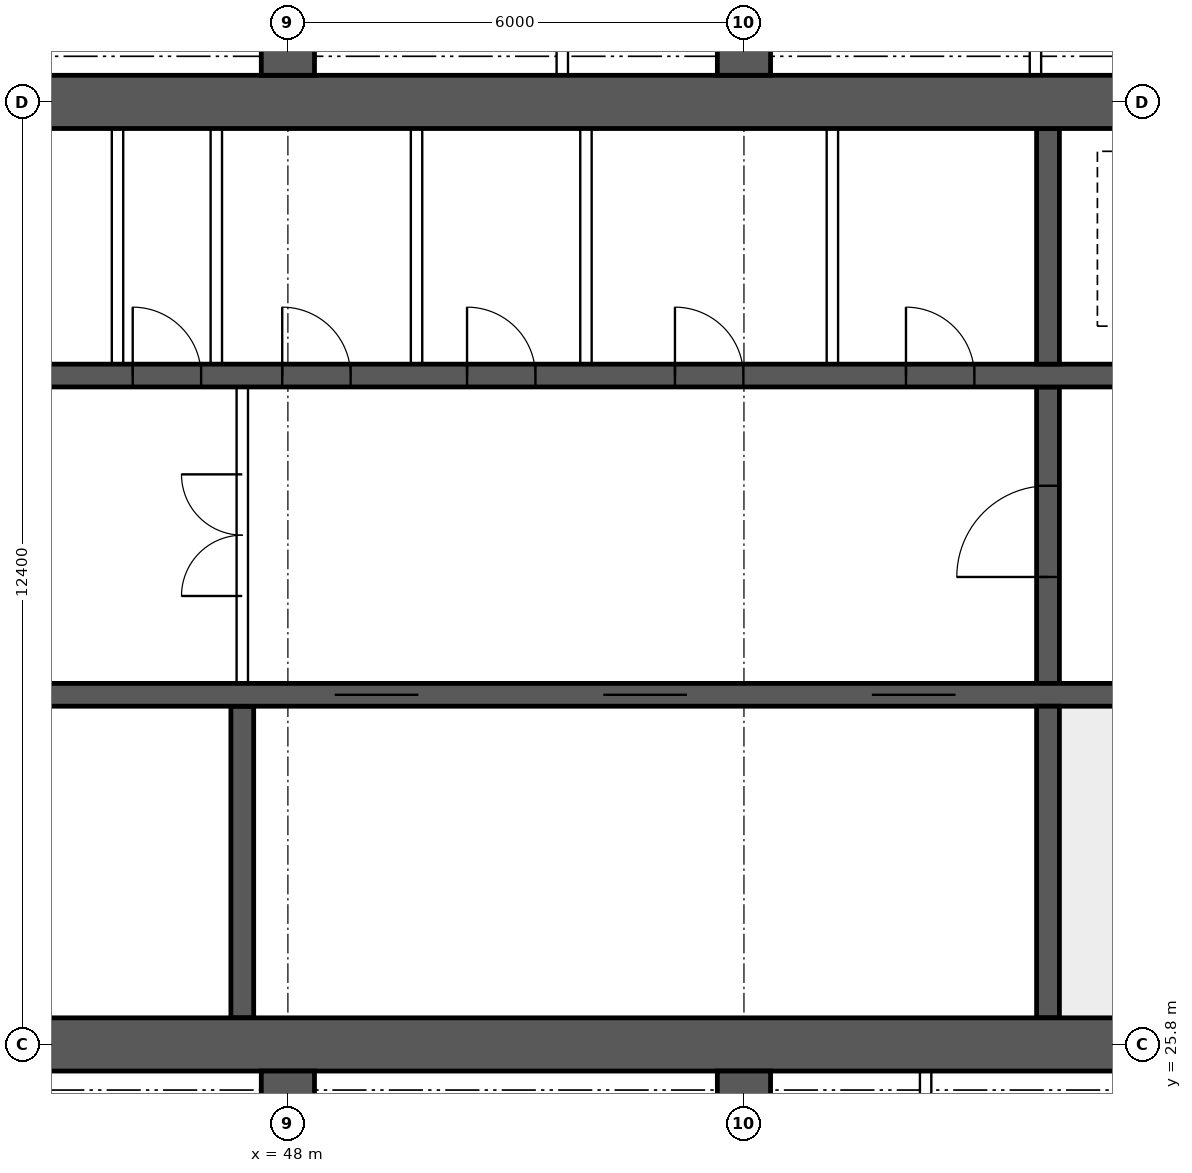
"""IFC4 building model, lengths in metres.
Left out: names, types, materials, properties, quantities, classifications, styles, units other than length and angle.
Written with IfcOpenShell. Run it as: python <this file> out.ifc"""

import sys

from ifc_helpers import new_model, si_unit, direction, frame, frame_2d, origin, place, context, subcontext, project, spatial, rectangle, extrude, element, fill, save


model = new_model("IFC4")
c1 = context("Model", 3, precision=1e-05, world=origin(), true_north=direction((0.0, 1.0)))
c2 = subcontext(c1, "Body", "Model", "MODEL_VIEW")
j1 = project(units=[si_unit("LENGTHUNIT", "METRE"), si_unit("PLANEANGLEUNIT", "RADIAN")], contexts=[c1])
p1 = place(None, origin())
s1 = spatial("IfcSite", under=j1, at=p1, CompositionType="ELEMENT")
p2 = place(p1, origin())
s2 = spatial("IfcBuilding", under=s1, at=p2, CompositionType="ELEMENT")
p3 = place(p2, frame((0.0, 0.0, 220.3)))
s3 = spatial("IfcBuildingStorey", under=s2, at=p3, CompositionType="ELEMENT", Elevation=220.3)
for number, where, z_axis, x_axis in (
    (1, (18.0, 25.8, 0.0), (0.0, 0.0, 1.0), (1.0, 0.0, 0.0)),
    (2, (18.0, 38.2, 0.0), (0.0, 0.0, 1.0), (1.0, 0.0, 0.0)),
):
    element("IfcWall", number, at=place(p3, frame(where, z_axis=z_axis, x_axis=x_axis)), inside=s3, PredefinedType="SHEAR", context=c2, shape_type="SweptSolid", body=[
        extrude(rectangle(XDim=48.0, YDim=0.7, at=frame_2d((24.0, 0.0))), origin(), (0.0, 0.0, 1.0), 3.75),
    ])
p4 = place(p3, frame((18.35, 30.4, 0.0), z_axis=(0.0, 0.0, 1.0), x_axis=(1.0, 0.0, 0.0)))
e3 = element("IfcWall", 3, at=p4, inside=s3, PredefinedType="SHEAR", context=c2, shape_type="SweptSolid", body=[
    extrude(rectangle(XDim=47.3, YDim=0.3, at=frame_2d((23.65, 0.0))), origin(), (0.0, 0.0, 1.0), 3.75),
])
p5 = place(p4, frame((0.4, 0.0, 0.0)))
e4 = element("IfcOpeningElement", 4, at=p5, cuts=e3, PredefinedType="OPENING", context=c2, shape_type="SweptSolid", body=[
    extrude(rectangle(XDim=1.0, YDim=2.1, at=frame_2d((0.5, 1.05))), frame((0.0, 0.16, 0.0), z_axis=(0.0, -1.0, 0.0), x_axis=(1.0, 0.0, 0.0)), (0.0, 0.0, 1.0), 0.32),
])
p6 = place(p4, frame((45.9, 0.0, 0.0)))
e5 = element("IfcOpeningElement", 5, at=p6, cuts=e3, PredefinedType="OPENING", context=c2, shape_type="SweptSolid", body=[
    extrude(rectangle(XDim=1.0, YDim=2.1, at=frame_2d((0.5, 1.05))), frame((0.0, 0.16, 0.0), z_axis=(0.0, -1.0, 0.0), x_axis=(1.0, 0.0, 0.0)), (0.0, 0.0, 1.0), 0.32),
])
p7 = place(p4, frame((8.4, 0.0, 0.0)))
e6 = element("IfcOpeningElement", 6, at=p7, cuts=e3, PredefinedType="OPENING", context=c2, shape_type="SweptSolid", body=[
    extrude(rectangle(XDim=1.1, YDim=2.1, at=frame_2d((0.55, 1.05))), frame((0.0, 0.16, 0.0), z_axis=(0.0, -1.0, 0.0), x_axis=(1.0, 0.0, 0.0)), (0.0, 0.0, 1.0), 0.32),
])
p8 = place(p4, frame((11.0, 0.0, 0.0)))
e7 = element("IfcOpeningElement", 7, at=p8, cuts=e3, PredefinedType="OPENING", context=c2, shape_type="SweptSolid", body=[
    extrude(rectangle(XDim=1.1, YDim=2.1, at=frame_2d((0.55, 1.05))), frame((0.0, 0.16, 0.0), z_axis=(0.0, -1.0, 0.0), x_axis=(1.0, 0.0, 0.0)), (0.0, 0.0, 1.0), 0.32),
])
p9 = place(p4, frame((13.6, 0.0, 0.0)))
e8 = element("IfcOpeningElement", 8, at=p9, cuts=e3, PredefinedType="OPENING", context=c2, shape_type="SweptSolid", body=[
    extrude(rectangle(XDim=1.1, YDim=2.1, at=frame_2d((0.55, 1.05))), frame((0.0, 0.16, 0.0), z_axis=(0.0, -1.0, 0.0), x_axis=(1.0, 0.0, 0.0)), (0.0, 0.0, 1.0), 0.32),
])
p10 = place(p4, frame((16.2, 0.0, 0.0)))
e9 = element("IfcOpeningElement", 9, at=p10, cuts=e3, PredefinedType="OPENING", context=c2, shape_type="SweptSolid", body=[
    extrude(rectangle(XDim=1.1, YDim=2.1, at=frame_2d((0.55, 1.05))), frame((0.0, 0.16, 0.0), z_axis=(0.0, -1.0, 0.0), x_axis=(1.0, 0.0, 0.0)), (0.0, 0.0, 1.0), 0.32),
])
p11 = place(p4, frame((18.975, 0.0, 0.0)))
e10 = element("IfcOpeningElement", 10, at=p11, cuts=e3, PredefinedType="OPENING", context=c2, shape_type="SweptSolid", body=[
    extrude(rectangle(XDim=0.9, YDim=2.1, at=frame_2d((0.45, 1.05))), frame((0.0, 0.16, 0.0), z_axis=(0.0, -1.0, 0.0), x_axis=(1.0, 0.0, 0.0)), (0.0, 0.0, 1.0), 0.32),
])
p12 = place(p4, frame((24.475, 0.0, 0.0)))
e11 = element("IfcOpeningElement", 11, at=p12, cuts=e3, PredefinedType="OPENING", context=c2, shape_type="SweptSolid", body=[
    extrude(rectangle(XDim=0.9, YDim=2.1, at=frame_2d((0.45, 1.05))), frame((0.0, 0.16, 0.0), z_axis=(0.0, -1.0, 0.0), x_axis=(1.0, 0.0, 0.0)), (0.0, 0.0, 1.0), 0.32),
])
p13 = place(p4, frame((30.267, 0.0, 0.0)))
e12 = element("IfcOpeningElement", 12, at=p13, cuts=e3, PredefinedType="OPENING", context=c2, shape_type="SweptSolid", body=[
    extrude(rectangle(XDim=1.1, YDim=2.1, at=frame_2d((0.55, 1.05))), frame((0.0, 0.16, 0.0), z_axis=(0.0, -1.0, 0.0), x_axis=(1.0, 0.0, 0.0)), (0.0, 0.0, 1.0), 0.32),
])
p14 = place(p4, frame((33.8, 0.0, 0.0)))
e13 = element("IfcOpeningElement", 13, at=p14, cuts=e3, PredefinedType="OPENING", context=c2, shape_type="SweptSolid", body=[
    extrude(rectangle(XDim=1.1, YDim=2.1, at=frame_2d((0.55, 1.05))), frame((0.0, 0.16, 0.0), z_axis=(0.0, -1.0, 0.0), x_axis=(1.0, 0.0, 0.0)), (0.0, 0.0, 1.0), 0.32),
])
p15 = place(p4, frame((37.333, 0.0, 0.0)))
e14 = element("IfcOpeningElement", 14, at=p15, cuts=e3, PredefinedType="OPENING", context=c2, shape_type="SweptSolid", body=[
    extrude(rectangle(XDim=1.1, YDim=2.1, at=frame_2d((0.55, 1.05))), frame((0.0, 0.16, 0.0), z_axis=(0.0, -1.0, 0.0), x_axis=(1.0, 0.0, 0.0)), (0.0, 0.0, 1.0), 0.32),
])
p16 = place(p3, frame((18.35, 34.6, 0.0), z_axis=(0.0, 0.0, 1.0), x_axis=(1.0, 0.0, 0.0)))
e15 = element("IfcWall", 15, at=p16, inside=s3, PredefinedType="SHEAR", context=c2, shape_type="SweptSolid", body=[
    extrude(rectangle(XDim=47.3, YDim=0.3, at=frame_2d((23.65, 0.0))), origin(), (0.0, 0.0, 1.0), 3.75),
])
p17 = place(p16, frame((0.9, 0.0, 0.0)))
e16 = element("IfcOpeningElement", 16, at=p17, cuts=e15, PredefinedType="OPENING", context=c2, shape_type="SweptSolid", body=[
    extrude(rectangle(XDim=1.1, YDim=2.1, at=frame_2d((0.55, 1.05))), frame((0.0, 0.16, 0.0), z_axis=(0.0, -1.0, 0.0), x_axis=(1.0, 0.0, 0.0)), (0.0, 0.0, 1.0), 0.32),
])
p18 = place(p16, frame((45.3, 0.0, 0.0)))
e17 = element("IfcOpeningElement", 17, at=p18, cuts=e15, PredefinedType="OPENING", context=c2, shape_type="SweptSolid", body=[
    extrude(rectangle(XDim=1.1, YDim=2.1, at=frame_2d((0.55, 1.05))), frame((0.0, 0.16, 0.0), z_axis=(0.0, -1.0, 0.0), x_axis=(1.0, 0.0, 0.0)), (0.0, 0.0, 1.0), 0.32),
])
p19 = place(p16, frame((4.25, 0.0, 0.0)))
e18 = element("IfcOpeningElement", 18, at=p19, cuts=e15, PredefinedType="OPENING", context=c2, shape_type="SweptSolid", body=[
    extrude(rectangle(XDim=0.9, YDim=2.1, at=frame_2d((0.45, 1.05))), frame((0.0, 0.16, 0.0), z_axis=(0.0, -1.0, 0.0), x_axis=(1.0, 0.0, 0.0)), (0.0, 0.0, 1.0), 0.32),
])
p20 = place(p16, frame((42.15, 0.0, 0.0)))
e19 = element("IfcOpeningElement", 19, at=p20, cuts=e15, PredefinedType="OPENING", context=c2, shape_type="SweptSolid", body=[
    extrude(rectangle(XDim=0.9, YDim=2.1, at=frame_2d((0.45, 1.05))), frame((0.0, 0.16, 0.0), z_axis=(0.0, -1.0, 0.0), x_axis=(1.0, 0.0, 0.0)), (0.0, 0.0, 1.0), 0.32),
])
p21 = place(p16, frame((9.025, 0.0, 0.0)))
e20 = element("IfcOpeningElement", 20, at=p21, cuts=e15, PredefinedType="OPENING", context=c2, shape_type="SweptSolid", body=[
    extrude(rectangle(XDim=0.9, YDim=2.1, at=frame_2d((0.45, 1.05))), frame((0.0, 0.16, 0.0), z_axis=(0.0, -1.0, 0.0), x_axis=(1.0, 0.0, 0.0)), (0.0, 0.0, 1.0), 0.32),
])
p22 = place(p16, frame((12.999, 0.0, 0.0)))
e21 = element("IfcOpeningElement", 21, at=p22, cuts=e15, PredefinedType="OPENING", context=c2, shape_type="SweptSolid", body=[
    extrude(rectangle(XDim=0.9, YDim=2.1, at=frame_2d((0.45, 1.05))), frame((0.0, 0.16, 0.0), z_axis=(0.0, -1.0, 0.0), x_axis=(1.0, 0.0, 0.0)), (0.0, 0.0, 1.0), 0.32),
])
p23 = place(p16, frame((16.646, 0.0, 0.0)))
e22 = element("IfcOpeningElement", 22, at=p23, cuts=e15, PredefinedType="OPENING", context=c2, shape_type="SweptSolid", body=[
    extrude(rectangle(XDim=0.9, YDim=2.1, at=frame_2d((0.45, 1.05))), frame((0.0, 0.16, 0.0), z_axis=(0.0, -1.0, 0.0), x_axis=(1.0, 0.0, 0.0)), (0.0, 0.0, 1.0), 0.32),
])
p24 = place(p16, frame((20.405, 0.0, 0.0)))
e23 = element("IfcOpeningElement", 23, at=p24, cuts=e15, PredefinedType="OPENING", context=c2, shape_type="SweptSolid", body=[
    extrude(rectangle(XDim=0.9, YDim=2.1, at=frame_2d((0.45, 1.05))), frame((0.0, 0.16, 0.0), z_axis=(0.0, -1.0, 0.0), x_axis=(1.0, 0.0, 0.0)), (0.0, 0.0, 1.0), 0.32),
])
p25 = place(p16, frame((24.811, 0.0, 0.0)))
e24 = element("IfcOpeningElement", 24, at=p25, cuts=e15, PredefinedType="OPENING", context=c2, shape_type="SweptSolid", body=[
    extrude(rectangle(XDim=0.9, YDim=2.1, at=frame_2d((0.45, 1.05))), frame((0.0, 0.16, 0.0), z_axis=(0.0, -1.0, 0.0), x_axis=(1.0, 0.0, 0.0)), (0.0, 0.0, 1.0), 0.32),
])
p26 = place(p16, frame((27.608, 0.0, 0.0)))
e25 = element("IfcOpeningElement", 25, at=p26, cuts=e15, PredefinedType="OPENING", context=c2, shape_type="SweptSolid", body=[
    extrude(rectangle(XDim=0.9, YDim=2.1, at=frame_2d((0.45, 1.05))), frame((0.0, 0.16, 0.0), z_axis=(0.0, -1.0, 0.0), x_axis=(1.0, 0.0, 0.0)), (0.0, 0.0, 1.0), 0.32),
])
p27 = place(p16, frame((29.575, 0.0, 0.0)))
e26 = element("IfcOpeningElement", 26, at=p27, cuts=e15, PredefinedType="OPENING", context=c2, shape_type="SweptSolid", body=[
    extrude(rectangle(XDim=0.9, YDim=2.1, at=frame_2d((0.45, 1.05))), frame((0.0, 0.16, 0.0), z_axis=(0.0, -1.0, 0.0), x_axis=(1.0, 0.0, 0.0)), (0.0, 0.0, 1.0), 0.32),
])
p28 = place(p16, frame((32.007, 0.0, 0.0)))
e27 = element("IfcOpeningElement", 27, at=p28, cuts=e15, PredefinedType="OPENING", context=c2, shape_type="SweptSolid", body=[
    extrude(rectangle(XDim=0.9, YDim=2.1, at=frame_2d((0.45, 1.05))), frame((0.0, 0.16, 0.0), z_axis=(0.0, -1.0, 0.0), x_axis=(1.0, 0.0, 0.0)), (0.0, 0.0, 1.0), 0.32),
])
p29 = place(p16, frame((34.742, 0.0, 0.0)))
e28 = element("IfcOpeningElement", 28, at=p29, cuts=e15, PredefinedType="OPENING", context=c2, shape_type="SweptSolid", body=[
    extrude(rectangle(XDim=0.9, YDim=2.1, at=frame_2d((0.45, 1.05))), frame((0.0, 0.16, 0.0), z_axis=(0.0, -1.0, 0.0), x_axis=(1.0, 0.0, 0.0)), (0.0, 0.0, 1.0), 0.32),
])
p30 = place(p16, frame((37.781, 0.0, 0.0)))
e29 = element("IfcOpeningElement", 29, at=p30, cuts=e15, PredefinedType="OPENING", context=c2, shape_type="SweptSolid", body=[
    extrude(rectangle(XDim=0.9, YDim=2.1, at=frame_2d((0.45, 1.05))), frame((0.0, 0.16, 0.0), z_axis=(0.0, -1.0, 0.0), x_axis=(1.0, 0.0, 0.0)), (0.0, 0.0, 1.0), 0.32),
])
p31 = place(p3, frame((58.0, 26.15, 0.0), z_axis=(0.0, 0.0, 1.0), x_axis=(0.0, 1.0, 0.0)))
e30 = element("IfcWall", 30, at=p31, inside=s3, PredefinedType="SHEAR", context=c2, shape_type="SweptSolid", body=[
    extrude(rectangle(XDim=4.1, YDim=0.3, at=frame_2d((2.05, 0.0))), origin(), (0.0, 0.0, 1.0), 3.75),
])
p32 = place(p3, frame((58.0, 30.55, 0.0), z_axis=(0.0, 0.0, 1.0), x_axis=(0.0, 1.0, 0.0)))
e31 = element("IfcWall", 31, at=p32, inside=s3, PredefinedType="SHEAR", context=c2, shape_type="SweptSolid", body=[
    extrude(rectangle(XDim=3.9, YDim=0.3, at=frame_2d((1.95, 0.0))), origin(), (0.0, 0.0, 1.0), 3.75),
])
p33 = place(p32, frame((1.4, 0.0, 0.0)))
e32 = element("IfcOpeningElement", 32, at=p33, cuts=e31, PredefinedType="OPENING", context=c2, shape_type="SweptSolid", body=[
    extrude(rectangle(XDim=1.2, YDim=2.1, at=frame_2d((0.6, 1.05))), frame((0.0, 0.16, 0.0), z_axis=(0.0, -1.0, 0.0), x_axis=(1.0, 0.0, 0.0)), (0.0, 0.0, 1.0), 0.32),
])
p34 = place(p3, frame((58.0, 34.75, 0.0), z_axis=(0.0, 0.0, 1.0), x_axis=(0.0, 1.0, 0.0)))
e33 = element("IfcWall", 33, at=p34, inside=s3, PredefinedType="SHEAR", context=c2, shape_type="SweptSolid", body=[
    extrude(rectangle(XDim=3.1, YDim=0.3, at=frame_2d((1.55, 0.0))), origin(), (0.0, 0.0, 1.0), 3.75),
])
p35 = place(p3, frame((47.4, 26.15, 0.0), z_axis=(0.0, 0.0, 1.0), x_axis=(0.0, 1.0, 0.0)))
e34 = element("IfcWall", 34, at=p35, inside=s3, PredefinedType="SHEAR", context=c2, shape_type="SweptSolid", body=[
    extrude(rectangle(XDim=4.1, YDim=0.3, at=frame_2d((2.05, 0.0))), origin(), (0.0, 0.0, 1.0), 3.75),
])
for number, where, z_axis, x_axis in (
    (35, (48.0, 18.4, 0.0), (0.0, 0.0, 1.0), (0.0, 1.0, 0.0)),
    (36, (48.0, 38.55, 0.0), (0.0, 0.0, 1.0), (0.0, 1.0, 0.0)),
    (37, (54.0, 18.4, 0.0), (0.0, 0.0, 1.0), (0.0, 1.0, 0.0)),
    (38, (54.0, 38.55, 0.0), (0.0, 0.0, 1.0), (0.0, 1.0, 0.0)),
):
    element("IfcWall", number, at=place(p3, frame(where, z_axis=z_axis, x_axis=x_axis)), inside=s3, PredefinedType="SHEAR", context=c2, shape_type="SweptSolid", body=[
        extrude(rectangle(XDim=7.05, YDim=0.7, at=frame_2d((3.525, 0.0))), origin(), (0.0, 0.0, 1.0), 3.75),
    ])
p36 = place(p3, frame((47.4, 30.55, 0.0), z_axis=(0.0, 0.0, 1.0), x_axis=(0.0, 1.0, 0.0)))
e39 = element("IfcWall", 39, at=p36, inside=s3, PredefinedType="SOLIDWALL", context=c2, shape_type="SweptSolid", body=[
    extrude(rectangle(XDim=3.9, YDim=0.15, at=frame_2d((1.95, 0.0))), origin(), (0.0, 0.0, 1.0), 3.5),
])
p37 = place(p36, frame((1.15, 0.0, 0.0)))
e40 = element("IfcOpeningElement", 40, at=p37, cuts=e39, PredefinedType="OPENING", context=c2, shape_type="SweptSolid", body=[
    extrude(rectangle(XDim=1.6, YDim=2.1, at=frame_2d((0.8, 1.05))), frame((0.0, 0.085, 0.0), z_axis=(0.0, -1.0, 0.0), x_axis=(1.0, 0.0, 0.0)), (0.0, 0.0, 1.0), 0.17),
])
for number, where, z_axis, x_axis in (
    (41, (45.758, 34.75, 0.0), (0.0, 0.0, 1.0), (0.0, 1.0, 0.0)),
    (42, (47.058, 34.75, 0.0), (0.0, 0.0, 1.0), (0.0, 1.0, 0.0)),
    (43, (49.692, 34.75, 0.0), (0.0, 0.0, 1.0), (0.0, 1.0, 0.0)),
    (44, (51.921, 34.75, 0.0), (0.0, 0.0, 1.0), (0.0, 1.0, 0.0)),
    (45, (55.163, 34.75, 0.0), (0.0, 0.0, 1.0), (0.0, 1.0, 0.0)),
):
    element("IfcWall", number, at=place(p3, frame(where, z_axis=z_axis, x_axis=x_axis)), inside=s3, PredefinedType="SOLIDWALL", context=c2, shape_type="SweptSolid", body=[
        extrude(rectangle(XDim=3.1, YDim=0.15, at=frame_2d((1.55, 0.0))), origin(), (0.0, 0.0, 1.0), 3.5),
    ])
for number, where, z_axis, x_axis in (
    (46, (56.39, 18.5, 0.0), (0.0, 0.0, 1.0), (0.0, 1.0, 0.0)),
    (47, (51.61, 38.55, 0.0), (0.0, 0.0, 1.0), (0.0, 1.0, 0.0)),
    (48, (57.835, 38.55, 0.0), (0.0, 0.0, 1.0), (0.0, 1.0, 0.0)),
):
    element("IfcWall", number, at=place(p3, frame(where, z_axis=z_axis, x_axis=x_axis)), inside=s3, PredefinedType="PARTITIONING", context=c2, shape_type="SweptSolid", body=[
        extrude(rectangle(XDim=6.95, YDim=0.15, at=frame_2d((3.475, 0.0))), origin(), (0.0, 0.0, 1.0), 3.5),
    ])
p38 = place(p37, origin())
e49 = element("IfcDoor", 49, at=p38, inside=s3, OperationType="DOUBLE_DOOR_SINGLE_SWING", PredefinedType="DOOR", context=c2, shape_type="SweptSolid", body=[
    extrude(rectangle(XDim=1.6, YDim=2.1, at=frame_2d((0.8, 1.05))), frame((0.0, 0.025, 0.0), z_axis=(0.0, -1.0, 0.0), x_axis=(1.0, 0.0, 0.0)), (0.0, 0.0, 1.0), 0.05),
])
fill(e40, e49)
p39 = place(p33, origin())
e50 = element("IfcDoor", 50, at=p39, inside=s3, OperationType="SINGLE_SWING_LEFT", PredefinedType="DOOR", context=c2, shape_type="SweptSolid", body=[
    extrude(rectangle(XDim=1.2, YDim=2.1, at=frame_2d((0.6, 1.05))), frame((0.0, 0.025, 0.0), z_axis=(0.0, -1.0, 0.0), x_axis=(1.0, 0.0, 0.0)), (0.0, 0.0, 1.0), 0.05),
])
fill(e32, e50)
p40 = place(p26, origin())
e51 = element("IfcDoor", 51, at=p40, inside=s3, OperationType="SINGLE_SWING_LEFT", PredefinedType="DOOR", context=c2, shape_type="SweptSolid", body=[
    extrude(rectangle(XDim=0.9, YDim=2.1, at=frame_2d((0.45, 1.05))), frame((0.0, 0.025, 0.0), z_axis=(0.0, -1.0, 0.0), x_axis=(1.0, 0.0, 0.0)), (0.0, 0.0, 1.0), 0.05),
])
fill(e25, e51)
p41 = place(p27, origin())
e52 = element("IfcDoor", 52, at=p41, inside=s3, OperationType="SINGLE_SWING_LEFT", PredefinedType="DOOR", context=c2, shape_type="SweptSolid", body=[
    extrude(rectangle(XDim=0.9, YDim=2.1, at=frame_2d((0.45, 1.05))), frame((0.0, 0.025, 0.0), z_axis=(0.0, -1.0, 0.0), x_axis=(1.0, 0.0, 0.0)), (0.0, 0.0, 1.0), 0.05),
])
fill(e26, e52)
p42 = place(p28, origin())
e53 = element("IfcDoor", 53, at=p42, inside=s3, OperationType="SINGLE_SWING_LEFT", PredefinedType="DOOR", context=c2, shape_type="SweptSolid", body=[
    extrude(rectangle(XDim=0.9, YDim=2.1, at=frame_2d((0.45, 1.05))), frame((0.0, 0.025, 0.0), z_axis=(0.0, -1.0, 0.0), x_axis=(1.0, 0.0, 0.0)), (0.0, 0.0, 1.0), 0.05),
])
fill(e27, e53)
p43 = place(p29, origin())
e54 = element("IfcDoor", 54, at=p43, inside=s3, OperationType="SINGLE_SWING_LEFT", PredefinedType="DOOR", context=c2, shape_type="SweptSolid", body=[
    extrude(rectangle(XDim=0.9, YDim=2.1, at=frame_2d((0.45, 1.05))), frame((0.0, 0.025, 0.0), z_axis=(0.0, -1.0, 0.0), x_axis=(1.0, 0.0, 0.0)), (0.0, 0.0, 1.0), 0.05),
])
fill(e28, e54)
p44 = place(p30, origin())
e55 = element("IfcDoor", 55, at=p44, inside=s3, OperationType="SINGLE_SWING_LEFT", PredefinedType="DOOR", context=c2, shape_type="SweptSolid", body=[
    extrude(rectangle(XDim=0.9, YDim=2.1, at=frame_2d((0.45, 1.05))), frame((0.0, 0.025, 0.0), z_axis=(0.0, -1.0, 0.0), x_axis=(1.0, 0.0, 0.0)), (0.0, 0.0, 1.0), 0.05),
])
fill(e29, e55)
p45 = place(p13, origin())
e56 = element("IfcDoor", 56, at=p45, inside=s3, OperationType="DOUBLE_DOOR_SLIDING", PredefinedType="DOOR", context=c2, shape_type="SweptSolid", body=[
    extrude(rectangle(XDim=1.1, YDim=2.1, at=frame_2d((0.55, 1.05))), frame((0.0, 0.025, 0.0), z_axis=(0.0, -1.0, 0.0), x_axis=(1.0, 0.0, 0.0)), (0.0, 0.0, 1.0), 0.05),
])
fill(e12, e56)
p46 = place(p14, origin())
e57 = element("IfcDoor", 57, at=p46, inside=s3, OperationType="DOUBLE_DOOR_SLIDING", PredefinedType="DOOR", context=c2, shape_type="SweptSolid", body=[
    extrude(rectangle(XDim=1.1, YDim=2.1, at=frame_2d((0.55, 1.05))), frame((0.0, 0.025, 0.0), z_axis=(0.0, -1.0, 0.0), x_axis=(1.0, 0.0, 0.0)), (0.0, 0.0, 1.0), 0.05),
])
fill(e13, e57)
p47 = place(p15, origin())
e58 = element("IfcDoor", 58, at=p47, inside=s3, OperationType="DOUBLE_DOOR_SLIDING", PredefinedType="DOOR", context=c2, shape_type="SweptSolid", body=[
    extrude(rectangle(XDim=1.1, YDim=2.1, at=frame_2d((0.55, 1.05))), frame((0.0, 0.025, 0.0), z_axis=(0.0, -1.0, 0.0), x_axis=(1.0, 0.0, 0.0)), (0.0, 0.0, 1.0), 0.05),
])
fill(e14, e58)
save(model, sys.argv[1])
